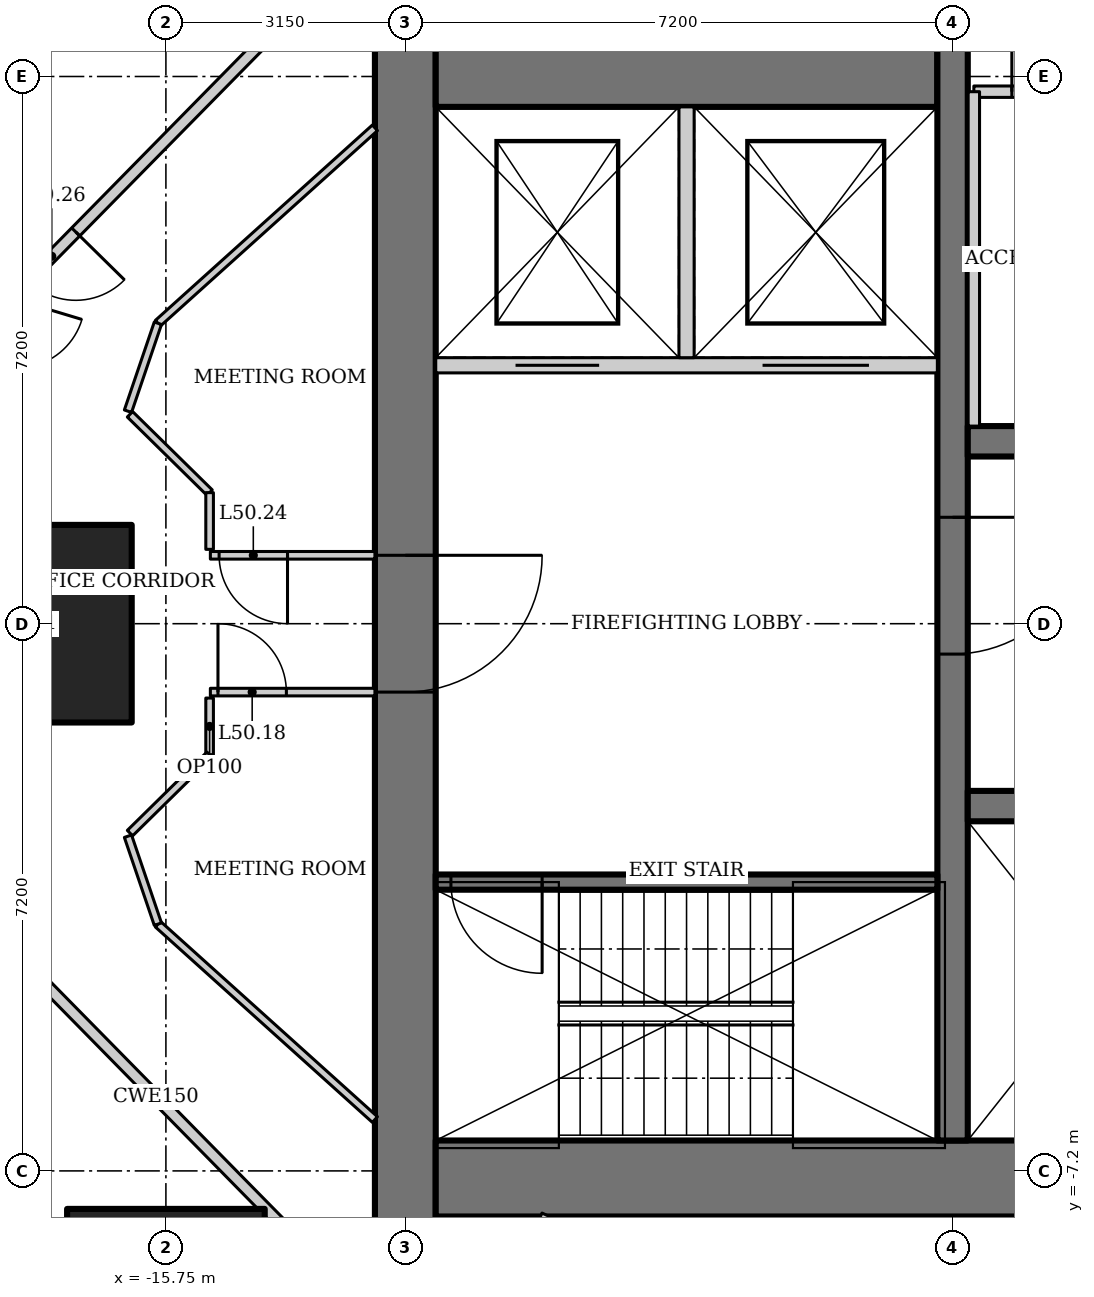
"""IFC4 building model, lengths in metres.
Left out: names, types, materials, properties, quantities, classifications, styles, units other than length and angle.
Written with IfcOpenShell. Run it as: python <this file> out.ifc"""

import sys

from ifc_helpers import new_model, si_unit, direction, frame, frame_2d, origin, origin_2d, place, context, subcontext, project, spatial, rectangle, hollow_rectangle, extrude, element, fill, save


model = new_model("IFC4")
c1 = context("Model", 3, precision=1e-05, world=origin(), true_north=direction((0.0, 1.0)))
c2 = subcontext(c1, "Body", "Model", "MODEL_VIEW")
j1 = project(units=[si_unit("LENGTHUNIT", "METRE"), si_unit("PLANEANGLEUNIT", "RADIAN")], contexts=[c1])
p1 = place(None, origin())
s1 = spatial("IfcSite", under=j1, at=p1, CompositionType="ELEMENT")
p2 = place(p1, origin())
s2 = spatial("IfcBuilding", under=s1, at=p2, CompositionType="ELEMENT")
p3 = place(p2, frame((0.0, 0.0, 215.8)))
s3 = spatial("IfcBuildingStorey", under=s2, at=p3, CompositionType="ELEMENT", Elevation=215.8)
for number, where, z_axis, x_axis in (
    (1, (-17.5, 0.0, 0.0), (0.0, 0.0, 1.0), (1.0, 0.0, 0.0)),
    (2, (-15.75, -9.0, 0.0), (0.0, 0.0, 1.0), (1.0, 0.0, 0.0)),
):
    element("IfcColumn", number, at=place(p3, frame(where, z_axis=z_axis, x_axis=x_axis)), inside=s3, PredefinedType="COLUMN", context=c2, shape_type="SweptSolid", body=[
        extrude(hollow_rectangle(XDim=2.6, YDim=2.6, WallThickness=0.13, at=origin_2d()), origin(), (0.0, 0.0, 1.0), 4.2),
    ])
p4 = place(p3, frame((-12.6, 13.0, 0.0), z_axis=(0.0, 0.0, 1.0), x_axis=(0.0, -1.0, 0.0)))
e3 = element("IfcWall", 3, at=p4, inside=s3, PredefinedType="SHEAR", context=c2, shape_type="SweptSolid", body=[
    extrude(rectangle(XDim=26.0, YDim=0.8, at=frame_2d((13.0, 0.0))), origin(), (0.0, 0.0, 1.0), 4.2),
])
p5 = place(p4, frame((12.1, 0.0, 0.0)))
e4 = element("IfcOpeningElement", 4, at=p5, cuts=e3, PredefinedType="OPENING", context=c2, shape_type="SweptSolid", body=[
    extrude(rectangle(XDim=1.8, YDim=2.1, at=frame_2d((0.9, 1.05))), frame((0.0, 0.41, 0.0), z_axis=(0.0, -1.0, 0.0), x_axis=(1.0, 0.0, 0.0)), (0.0, 0.0, 1.0), 0.82),
])
p6 = place(p3, frame((-12.2, -7.3, 0.0), z_axis=(0.0, 0.0, 1.0), x_axis=(1.0, 0.0, 0.0)))
e5 = element("IfcWall", 5, at=p6, inside=s3, PredefinedType="SHEAR", context=c2, shape_type="SweptSolid", body=[
    extrude(rectangle(XDim=24.4, YDim=1.0, at=frame_2d((12.2, 0.0))), origin(), (0.0, 0.0, 1.0), 4.2),
])
p7 = place(p3, frame((-5.6, 7.3, 0.0), z_axis=(0.0, 0.0, 1.0), x_axis=(-1.0, 0.0, 0.0)))
e6 = element("IfcWall", 6, at=p7, inside=s3, PredefinedType="SHEAR", context=c2, shape_type="SweptSolid", body=[
    extrude(rectangle(XDim=6.6, YDim=1.0, at=frame_2d((3.3, 0.0))), origin(), (0.0, 0.0, 1.0), 4.2),
])
p8 = place(p3, frame((-5.4, 7.8, 0.0), z_axis=(0.0, 0.0, 1.0), x_axis=(0.0, -1.0, 0.0)))
e7 = element("IfcWall", 7, at=p8, inside=s3, PredefinedType="SHEAR", context=c2, shape_type="SweptSolid", body=[
    extrude(rectangle(XDim=14.6, YDim=0.4, at=frame_2d((7.3, 0.0))), origin(), (0.0, 0.0, 1.0), 4.2),
])
p9 = place(p8, frame((6.4, 0.0, 0.0)))
e8 = element("IfcOpeningElement", 8, at=p9, cuts=e7, PredefinedType="OPENING", context=c2, shape_type="SweptSolid", body=[
    extrude(rectangle(XDim=1.8, YDim=2.1, at=frame_2d((0.9, 1.05))), frame((0.0, 0.21, 0.0), z_axis=(0.0, -1.0, 0.0), x_axis=(1.0, 0.0, 0.0)), (0.0, 0.0, 1.0), 0.42),
])
p10 = place(p3, frame((-5.2, -2.4, 0.0), z_axis=(0.0, 0.0, 1.0), x_axis=(1.0, 0.0, 0.0)))
e9 = element("IfcWall", 9, at=p10, inside=s3, PredefinedType="SHEAR", context=c2, shape_type="SweptSolid", body=[
    extrude(rectangle(XDim=10.4, YDim=0.4, at=frame_2d((5.2, 0.0))), origin(), (0.0, 0.0, 1.0), 4.2),
])
p11 = place(p10, frame((1.683, 0.0, 0.0)))
e10 = element("IfcOpeningElement", 10, at=p11, cuts=e9, PredefinedType="OPENING", context=c2, shape_type="SweptSolid", body=[
    extrude(rectangle(XDim=1.1, YDim=2.2, at=frame_2d((0.55, 1.1))), frame((0.0, 0.21, 0.0), z_axis=(0.0, -1.0, 0.0), x_axis=(1.0, 0.0, 0.0)), (0.0, 0.0, 1.0), 0.42),
])
p12 = place(p10, frame((5.217, 0.0, 0.0)))
e11 = element("IfcOpeningElement", 11, at=p12, cuts=e9, PredefinedType="OPENING", context=c2, shape_type="SweptSolid", body=[
    extrude(rectangle(XDim=1.1, YDim=2.2, at=frame_2d((0.55, 1.1))), frame((0.0, 0.21, 0.0), z_axis=(0.0, -1.0, 0.0), x_axis=(1.0, 0.0, 0.0)), (0.0, 0.0, 1.0), 0.42),
])
p13 = place(p10, frame((8.75, 0.0, 0.0)))
e12 = element("IfcOpeningElement", 12, at=p13, cuts=e9, PredefinedType="OPENING", context=c2, shape_type="SweptSolid", body=[
    extrude(rectangle(XDim=1.1, YDim=2.2, at=frame_2d((0.55, 1.1))), frame((0.0, 0.21, 0.0), z_axis=(0.0, -1.0, 0.0), x_axis=(1.0, 0.0, 0.0)), (0.0, 0.0, 1.0), 0.42),
])
p14 = place(p3, frame((5.2, 2.4, 0.0), z_axis=(0.0, 0.0, 1.0), x_axis=(-1.0, 0.0, 0.0)))
e13 = element("IfcWall", 13, at=p14, inside=s3, PredefinedType="SHEAR", context=c2, shape_type="SweptSolid", body=[
    extrude(rectangle(XDim=10.4, YDim=0.4, at=frame_2d((5.2, 0.0))), origin(), (0.0, 0.0, 1.0), 4.2),
])
p15 = place(p3, frame((-5.6, -3.4, 0.0), z_axis=(0.0, 0.0, 1.0), x_axis=(-1.0, 0.0, 0.0)))
e14 = element("IfcWall", 14, at=p15, inside=s3, PredefinedType="SHEAR", context=c2, shape_type="SweptSolid", body=[
    extrude(rectangle(XDim=6.6, YDim=0.2, at=frame_2d((3.3, 0.0))), origin(), (0.0, 0.0, 1.0), 4.2),
])
p16 = place(p15, frame((5.2, 0.0, 0.0)))
e15 = element("IfcOpeningElement", 15, at=p16, cuts=e14, PredefinedType="OPENING", context=c2, shape_type="SweptSolid", body=[
    extrude(rectangle(XDim=1.2, YDim=2.1, at=frame_2d((0.6, 1.05))), frame((0.0, 0.11, 0.0), z_axis=(0.0, -1.0, 0.0), x_axis=(1.0, 0.0, 0.0)), (0.0, 0.0, 1.0), 0.22),
])
p17 = place(p3, frame((-12.2, 3.4, 0.0), z_axis=(0.0, 0.0, 1.0), x_axis=(1.0, 0.0, 0.0)))
e16 = element("IfcWall", 16, at=p17, inside=s3, PredefinedType="SOLIDWALL", context=c2, shape_type="SweptSolid", body=[
    extrude(rectangle(XDim=6.6, YDim=0.2, at=frame_2d((3.3, 0.0))), origin(), (0.0, 0.0, 1.0), 4.2),
])
p18 = place(p17, frame((1.05, 0.0, 0.0)))
e17 = element("IfcOpeningElement", 17, at=p18, cuts=e16, PredefinedType="OPENING", context=c2, shape_type="SweptSolid", body=[
    extrude(rectangle(XDim=1.1, YDim=2.2, at=frame_2d((0.55, 1.1))), frame((0.0, 0.11, 0.0), z_axis=(0.0, -1.0, 0.0), x_axis=(1.0, 0.0, 0.0)), (0.0, 0.0, 1.0), 0.22),
])
p19 = place(p17, frame((4.3, 0.0, 0.0)))
e18 = element("IfcOpeningElement", 18, at=p19, cuts=e16, PredefinedType="OPENING", context=c2, shape_type="SweptSolid", body=[
    extrude(rectangle(XDim=1.4, YDim=2.2, at=frame_2d((0.7, 1.1))), frame((0.0, 0.11, 0.0), z_axis=(0.0, -1.0, 0.0), x_axis=(1.0, 0.0, 0.0)), (0.0, 0.0, 1.0), 0.22),
])
p20 = place(p3, frame((-8.9, 3.5, 0.0), z_axis=(0.0, 0.0, 1.0), x_axis=(0.0, 1.0, 0.0)))
e19 = element("IfcWall", 19, at=p20, inside=s3, PredefinedType="SOLIDWALL", context=c2, shape_type="SweptSolid", body=[
    extrude(rectangle(XDim=3.3, YDim=0.2, at=frame_2d((1.65, 0.0))), origin(), (0.0, 0.0, 1.0), 4.2),
])
p21 = place(p3, frame((-14.089, 8.051, 0.0), z_axis=(0.0, 0.0, 1.0), x_axis=(-0.701111216625, -0.713051934941, 0.0)))
e20 = element("IfcWall", 20, at=p21, inside=s3, PredefinedType="PARTITIONING", context=c2, shape_type="SweptSolid", body=[
    extrude(rectangle(XDim=5.112, YDim=0.15, at=frame_2d((2.556, 0.0))), origin(), (0.0, 0.0, 1.0), 4.05),
])
p22 = place(p21, frame((4.061, 0.0, 0.0)))
e21 = element("IfcOpeningElement", 21, at=p22, cuts=e20, PredefinedType="OPENING", context=c2, shape_type="SweptSolid", body=[
    extrude(rectangle(XDim=0.9, YDim=2.1, at=frame_2d((0.45, 1.05))), frame((0.0, 0.085, 0.0), z_axis=(0.0, -1.0, 0.0), x_axis=(1.0, 0.0, 0.0)), (0.0, 0.0, 1.0), 0.17),
])
p23 = place(p3, frame((-17.673, -4.406, 0.0), z_axis=(0.0, 0.0, 1.0), x_axis=(0.701111216625, -0.713051934941, 0.0)))
e22 = element("IfcWall", 22, at=p23, inside=s3, PredefinedType="PARTITIONING", context=c2, shape_type="SweptSolid", body=[
    extrude(rectangle(XDim=5.112, YDim=0.15, at=frame_2d((2.556, 0.0))), origin(), (0.0, 0.0, 1.0), 4.05),
])
p24 = place(p3, frame((-5.12, 7.0, 0.0), z_axis=(0.0, 0.0, 1.0), x_axis=(1.0, 0.0, 0.0)))
e23 = element("IfcWall", 23, at=p24, inside=s3, PredefinedType="SOLIDWALL", context=c2, shape_type="SweptSolid", body=[
    extrude(rectangle(XDim=10.24, YDim=0.15, at=frame_2d((5.12, 0.0))), origin(), (0.0, 0.0, 1.0), 4.05),
])
p25 = place(p24, frame((0.5, 0.0, 0.0)))
e24 = element("IfcOpeningElement", 24, at=p25, cuts=e23, PredefinedType="OPENING", context=c2, shape_type="SweptSolid", body=[
    extrude(rectangle(XDim=1.0, YDim=2.1, at=frame_2d((0.5, 1.05))), frame((0.0, 0.085, 0.0), z_axis=(0.0, -1.0, 0.0), x_axis=(1.0, 0.0, 0.0)), (0.0, 0.0, 1.0), 0.17),
])
p26 = place(p24, frame((3.248, 0.0, 0.0)))
e25 = element("IfcOpeningElement", 25, at=p26, cuts=e23, PredefinedType="OPENING", context=c2, shape_type="SweptSolid", body=[
    extrude(rectangle(XDim=0.9, YDim=2.1, at=frame_2d((0.45, 1.05))), frame((0.0, 0.085, 0.0), z_axis=(0.0, -1.0, 0.0), x_axis=(1.0, 0.0, 0.0)), (0.0, 0.0, 1.0), 0.17),
])
p27 = place(p24, frame((6.525, 0.0, 0.0)))
e26 = element("IfcOpeningElement", 26, at=p27, cuts=e23, PredefinedType="OPENING", context=c2, shape_type="SweptSolid", body=[
    extrude(rectangle(XDim=0.9, YDim=2.1, at=frame_2d((0.45, 1.05))), frame((0.0, 0.085, 0.0), z_axis=(0.0, -1.0, 0.0), x_axis=(1.0, 0.0, 0.0)), (0.0, 0.0, 1.0), 0.17),
])
p28 = place(p24, frame((8.952, 0.0, 0.0)))
e27 = element("IfcOpeningElement", 27, at=p28, cuts=e23, PredefinedType="OPENING", context=c2, shape_type="SweptSolid", body=[
    extrude(rectangle(XDim=0.9, YDim=2.1, at=frame_2d((0.45, 1.05))), frame((0.0, 0.085, 0.0), z_axis=(0.0, -1.0, 0.0), x_axis=(1.0, 0.0, 0.0)), (0.0, 0.0, 1.0), 0.17),
])
p29 = place(p3, frame((-5.12, 2.6, 0.0), z_axis=(0.0, 0.0, 1.0), x_axis=(0.0, 1.0, 0.0)))
e28 = element("IfcWall", 28, at=p29, inside=s3, PredefinedType="SOLIDWALL", context=c2, shape_type="SweptSolid", body=[
    extrude(rectangle(XDim=4.4, YDim=0.15, at=frame_2d((2.2, 0.0))), origin(), (0.0, 0.0, 1.0), 4.05),
])
p30 = place(p3, frame((-13.0, -6.524, 0.0), z_axis=(0.0, 0.0, 1.0), x_axis=(-0.743177243228, 0.669094601046, 0.0)))
e29 = element("IfcWall", 29, at=p30, inside=s3, PredefinedType="PARTITIONING", context=c2, shape_type="SweptSolid", body=[
    extrude(rectangle(XDim=3.843, YDim=0.1, at=frame_2d((1.921, 0.0))), origin(), (0.0, 0.0, 1.0), 4.05),
])
p31 = place(p3, frame((-8.548, -8.851, 0.0), z_axis=(0.0, 0.0, 1.0), x_axis=(-0.907759689292, 0.419490579748, 0.0)))
e30 = element("IfcWall", 30, at=p31, inside=s3, PredefinedType="PARTITIONING", context=c2, shape_type="SweptSolid", body=[
    extrude(rectangle(XDim=2.506, YDim=0.1, at=frame_2d((1.253, 0.0))), origin(), (0.0, 0.0, 1.0), 4.05),
])
p32 = place(p3, frame((-15.856, 3.953, 0.0), z_axis=(0.0, 0.0, 1.0), x_axis=(0.743177243228, 0.669094601046, 0.0)))
e31 = element("IfcWall", 31, at=p32, inside=s3, PredefinedType="PARTITIONING", context=c2, shape_type="SweptSolid", body=[
    extrude(rectangle(XDim=3.843, YDim=0.1, at=frame_2d((1.921, 0.0))), origin(), (0.0, 0.0, 1.0), 4.05),
])
p33 = place(p3, frame((-15.856, -3.953, 0.0), z_axis=(0.0, 0.0, 1.0), x_axis=(-0.321913473529, 0.946769093053, 0.0)))
e32 = element("IfcWall", 32, at=p33, inside=s3, PredefinedType="PARTITIONING", context=c2, shape_type="SweptSolid", body=[
    extrude(rectangle(XDim=1.223, YDim=0.1, at=frame_2d((0.611, 0.0))), origin(), (0.0, 0.0, 1.0), 4.05),
])
p34 = place(p3, frame((-15.165, -0.9, 0.0), z_axis=(0.0, 0.0, 1.0), x_axis=(1.0, 0.0, 0.0)))
e33 = element("IfcWall", 33, at=p34, inside=s3, PredefinedType="PARTITIONING", context=c2, shape_type="SweptSolid", body=[
    extrude(rectangle(XDim=2.165, YDim=0.1, at=frame_2d((1.083, 0.0))), origin(), (0.0, 0.0, 1.0), 4.05),
])
p35 = place(p34, frame((0.1, 0.0, 0.0)))
e34 = element("IfcOpeningElement", 34, at=p35, cuts=e33, PredefinedType="OPENING", context=c2, shape_type="SweptSolid", body=[
    extrude(rectangle(XDim=0.9, YDim=2.1, at=frame_2d((0.45, 1.05))), frame((0.0, 0.06, 0.0), z_axis=(0.0, -1.0, 0.0), x_axis=(1.0, 0.0, 0.0)), (0.0, 0.0, 1.0), 0.12),
])
p36 = place(p3, frame((-13.0, 0.9, 0.0), z_axis=(0.0, 0.0, 1.0), x_axis=(-1.0, 0.0, 0.0)))
e35 = element("IfcWall", 35, at=p36, inside=s3, PredefinedType="PARTITIONING", context=c2, shape_type="SweptSolid", body=[
    extrude(rectangle(XDim=2.165, YDim=0.1, at=frame_2d((1.083, 0.0))), origin(), (0.0, 0.0, 1.0), 4.05),
])
p37 = place(p36, frame((1.15, 0.0, 0.0)))
e36 = element("IfcOpeningElement", 36, at=p37, cuts=e35, PredefinedType="OPENING", context=c2, shape_type="SweptSolid", body=[
    extrude(rectangle(XDim=0.9, YDim=2.1, at=frame_2d((0.45, 1.05))), frame((0.0, 0.06, 0.0), z_axis=(0.0, -1.0, 0.0), x_axis=(1.0, 0.0, 0.0)), (0.0, 0.0, 1.0), 0.12),
])
p38 = place(p3, frame((-16.249, 2.796, 0.0), z_axis=(0.0, 0.0, 1.0), x_axis=(0.321913473529, 0.946769093053, 0.0)))
e37 = element("IfcWall", 37, at=p38, inside=s3, PredefinedType="PARTITIONING", context=c2, shape_type="SweptSolid", body=[
    extrude(rectangle(XDim=1.223, YDim=0.1, at=frame_2d((0.611, 0.0))), origin(), (0.0, 0.0, 1.0), 4.05),
])
p39 = place(p3, frame((-15.175, -0.978, 0.0), z_axis=(0.0, 0.0, 1.0), x_axis=(0.0, -1.0, 0.0)))
e38 = element("IfcWall", 38, at=p39, inside=s3, PredefinedType="PARTITIONING", context=c2, shape_type="SweptSolid", body=[
    extrude(rectangle(XDim=0.746, YDim=0.1, at=frame_2d((0.373, 0.0))), origin(), (0.0, 0.0, 1.0), 4.05),
])
for number, where, z_axis, x_axis in (
    (39, (-15.175, -1.725, 0.0), (0.0, 0.0, 1.0), (-0.713, -0.701, 0.0)),
    (40, (-16.223, 2.755, 0.0), (0.0, 0.0, 1.0), (0.713, -0.701, 0.0)),
):
    element("IfcWall", number, at=place(p3, frame(where, z_axis=z_axis, x_axis=x_axis)), inside=s3, PredefinedType="PARTITIONING", context=c2, shape_type="SweptSolid", body=[
        extrude(rectangle(XDim=1.469, YDim=0.1, at=frame_2d((0.735, 0.0))), origin(), (0.0, 0.0, 1.0), 4.05),
    ])
p40 = place(p3, frame((-15.175, 1.725, 0.0), z_axis=(0.0, 0.0, 1.0), x_axis=(0.0, -1.0, 0.0)))
e41 = element("IfcWall", 41, at=p40, inside=s3, PredefinedType="PARTITIONING", context=c2, shape_type="SweptSolid", body=[
    extrude(rectangle(XDim=0.746, YDim=0.1, at=frame_2d((0.373, 0.0))), origin(), (0.0, 0.0, 1.0), 4.05),
])
p41 = place(p9, origin())
e42 = element("IfcDoor", 42, at=p41, inside=s3, OperationType="DOUBLE_DOOR_DOUBLE_SWING", PredefinedType="DOOR", context=c2, shape_type="SweptSolid", body=[
    extrude(rectangle(XDim=1.8, YDim=2.1, at=frame_2d((0.9, 1.05))), frame((0.0, 0.025, 0.0), z_axis=(0.0, -1.0, 0.0), x_axis=(1.0, 0.0, 0.0)), (0.0, 0.0, 1.0), 0.05),
])
fill(e8, e42)
p42 = place(p16, origin())
e43 = element("IfcDoor", 43, at=p42, inside=s3, OperationType="SINGLE_SWING_RIGHT", PredefinedType="DOOR", context=c2, shape_type="SweptSolid", body=[
    extrude(rectangle(XDim=1.2, YDim=2.1, at=frame_2d((0.6, 1.05))), frame((0.0, 0.025, 0.0), z_axis=(0.0, -1.0, 0.0), x_axis=(1.0, 0.0, 0.0)), (0.0, 0.0, 1.0), 0.05),
])
fill(e15, e43)
p43 = place(p5, origin())
e44 = element("IfcDoor", 44, at=p43, inside=s3, OperationType="DOUBLE_DOOR_DOUBLE_SWING", PredefinedType="DOOR", context=c2, shape_type="SweptSolid", body=[
    extrude(rectangle(XDim=1.8, YDim=2.1, at=frame_2d((0.9, 1.05))), frame((0.0, 0.025, 0.0), z_axis=(0.0, -1.0, 0.0), x_axis=(1.0, 0.0, 0.0)), (0.0, 0.0, 1.0), 0.05),
])
fill(e4, e44)
p44 = place(p18, origin())
e45 = element("IfcDoor", 45, at=p44, inside=s3, OperationType="DOUBLE_DOOR_SLIDING", PredefinedType="DOOR", context=c2, shape_type="SweptSolid", body=[
    extrude(rectangle(XDim=1.1, YDim=2.2, at=frame_2d((0.55, 1.1))), frame((0.0, 0.025, 0.0), z_axis=(0.0, -1.0, 0.0), x_axis=(1.0, 0.0, 0.0)), (0.0, 0.0, 1.0), 0.05),
])
fill(e17, e45)
p45 = place(p19, origin())
e46 = element("IfcDoor", 46, at=p45, inside=s3, OperationType="DOUBLE_DOOR_SLIDING", PredefinedType="DOOR", context=c2, shape_type="SweptSolid", body=[
    extrude(rectangle(XDim=1.4, YDim=2.2, at=frame_2d((0.7, 1.1))), frame((0.0, 0.025, 0.0), z_axis=(0.0, -1.0, 0.0), x_axis=(1.0, 0.0, 0.0)), (0.0, 0.0, 1.0), 0.05),
])
fill(e18, e46)
p46 = place(p25, origin())
e47 = element("IfcDoor", 47, at=p46, inside=s3, OperationType="SINGLE_SWING_LEFT", PredefinedType="DOOR", context=c2, shape_type="SweptSolid", body=[
    extrude(rectangle(XDim=1.0, YDim=2.1, at=frame_2d((0.5, 1.05))), frame((0.0, 0.025, 0.0), z_axis=(0.0, -1.0, 0.0), x_axis=(1.0, 0.0, 0.0)), (0.0, 0.0, 1.0), 0.05),
])
fill(e24, e47)
p47 = place(p35, origin())
e48 = element("IfcDoor", 48, at=p47, inside=s3, OperationType="SINGLE_SWING_LEFT", PredefinedType="DOOR", context=c2, shape_type="SweptSolid", body=[
    extrude(rectangle(XDim=0.9, YDim=2.1, at=frame_2d((0.45, 1.05))), frame((0.0, 0.025, 0.0), z_axis=(0.0, -1.0, 0.0), x_axis=(1.0, 0.0, 0.0)), (0.0, 0.0, 1.0), 0.05),
])
fill(e34, e48)
p48 = place(p37, origin())
e49 = element("IfcDoor", 49, at=p48, inside=s3, OperationType="SINGLE_SWING_LEFT", PredefinedType="DOOR", context=c2, shape_type="SweptSolid", body=[
    extrude(rectangle(XDim=0.9, YDim=2.1, at=frame_2d((0.45, 1.05))), frame((0.0, 0.025, 0.0), z_axis=(0.0, -1.0, 0.0), x_axis=(1.0, 0.0, 0.0)), (0.0, 0.0, 1.0), 0.05),
])
fill(e36, e49)
p49 = place(p22, origin())
e50 = element("IfcDoor", 50, at=p49, inside=s3, OperationType="SINGLE_SWING_LEFT", PredefinedType="DOOR", context=c2, shape_type="SweptSolid", body=[
    extrude(rectangle(XDim=0.9, YDim=2.1, at=frame_2d((0.45, 1.05))), frame((0.0, 0.025, 0.0), z_axis=(0.0, -1.0, 0.0), x_axis=(1.0, 0.0, 0.0)), (0.0, 0.0, 1.0), 0.05),
])
fill(e21, e50)
save(model, sys.argv[1])
